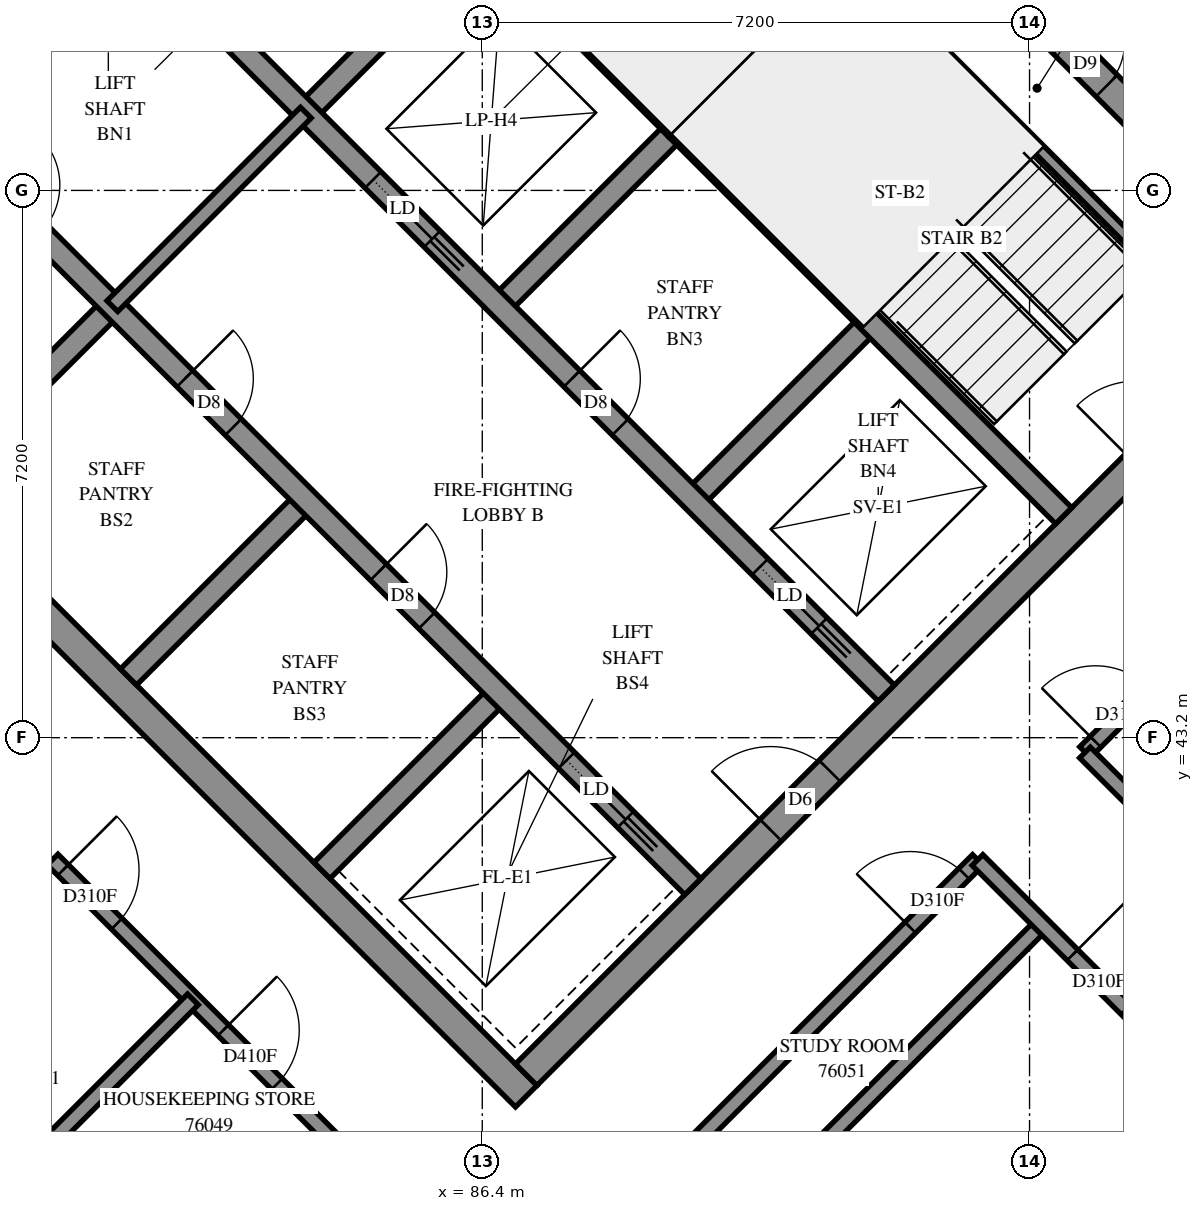
"""IFC4 building model, lengths in metres.
Left out: names, types, materials, properties, quantities, classifications, styles, units other than length and angle.
Written with IfcOpenShell. Run it as: python <this file> out.ifc"""

import sys

from ifc_helpers import new_model, si_unit, direction, frame, frame_2d, origin, place, context, subcontext, project, spatial, polyline, rectangle, outline, extrude, element, fill, save


model = new_model("IFC4")
c1 = context("Model", 3, precision=1e-05, world=origin(), true_north=direction((0.0, 1.0)))
c2 = subcontext(c1, "Body", "Model", "MODEL_VIEW")
j1 = project(units=[si_unit("LENGTHUNIT", "METRE"), si_unit("PLANEANGLEUNIT", "RADIAN")], contexts=[c1])
p1 = place(None, origin())
s1 = spatial("IfcSite", under=j1, at=p1, CompositionType="ELEMENT")
p2 = place(p1, origin())
s2 = spatial("IfcBuilding", under=s1, at=p2, CompositionType="ELEMENT")
p3 = place(p2, frame((0.0, 0.0, 277.8)))
s3 = spatial("IfcBuildingStorey", under=s2, at=p3, CompositionType="ELEMENT", Elevation=277.8)
p4 = place(p3, frame((76.23, 49.231, -0.3), z_axis=(0.0, 0.0, 1.0), x_axis=(0.7071034917, -0.7071100706, 0.0)))
e1 = element("IfcWall", 1, at=p4, inside=s3, PredefinedType="SHEAR", context=c2, shape_type="SweptSolid", body=[
    extrude(rectangle(XDim=15.2, YDim=0.4, at=frame_2d((7.6, 0.0))), origin(), (0.0, 0.0, 1.0), 2.7),
])
p5 = place(p3, frame((86.695, 59.696, -0.3), z_axis=(0.0, 0.0, 1.0), x_axis=(0.7071100706, -0.7071034917, 0.0)))
e2 = element("IfcWall", 2, at=p5, inside=s3, PredefinedType="SHEAR", context=c2, shape_type="SweptSolid", body=[
    extrude(rectangle(XDim=15.2, YDim=0.4, at=frame_2d((7.6, 0.0))), origin(), (0.0, 0.0, 1.0), 2.7),
])
p6 = place(p5, frame((10.4, 0.0, 0.3)))
e3 = element("IfcOpeningElement", 3, at=p6, cuts=e2, PredefinedType="OPENING", context=c2, shape_type="SweptSolid", body=[
    extrude(rectangle(XDim=0.8, YDim=2.1, at=frame_2d((0.4, 1.05))), frame((0.0, 0.21, 0.0), z_axis=(0.0, -1.0, 0.0), x_axis=(1.0, 0.0, 0.0)), (0.0, 0.0, 1.0), 0.42),
])
p7 = place(p3, frame((76.513, 49.231, -0.3), z_axis=(0.0, 0.0, 1.0), x_axis=(0.7071067812, 0.7071067812, 0.0)))
e4 = element("IfcWall", 4, at=p7, inside=s3, PredefinedType="SHEAR", context=c2, shape_type="SweptSolid", body=[
    extrude(rectangle(XDim=14.4, YDim=0.4, at=frame_2d((7.2, 0.0))), origin(), (0.0, 0.0, 1.0), 2.7),
])
p8 = place(p7, frame((4.55, 0.0, 0.3)))
e5 = element("IfcOpeningElement", 5, at=p8, cuts=e4, PredefinedType="OPENING", context=c2, shape_type="SweptSolid", body=[
    extrude(rectangle(XDim=1.1, YDim=2.1, at=frame_2d((0.55, 1.05))), frame((0.0, 0.21, 0.0), z_axis=(0.0, -1.0, 0.0), x_axis=(1.0, 0.0, 0.0)), (0.0, 0.0, 1.0), 0.42),
])
p9 = place(p7, frame((11.35, 0.0, 0.3)))
e6 = element("IfcOpeningElement", 6, at=p9, cuts=e4, PredefinedType="OPENING", context=c2, shape_type="SweptSolid", body=[
    extrude(rectangle(XDim=1.1, YDim=2.1, at=frame_2d((0.55, 1.05))), frame((0.0, 0.21, 0.0), z_axis=(0.0, -1.0, 0.0), x_axis=(1.0, 0.0, 0.0)), (0.0, 0.0, 1.0), 0.42),
])
p10 = place(p3, frame((86.978, 38.766, -0.3), z_axis=(0.0, 0.0, 1.0), x_axis=(0.7071067812, 0.7071067812, 0.0)))
e7 = element("IfcWall", 7, at=p10, inside=s3, PredefinedType="SHEAR", context=c2, shape_type="SweptSolid", body=[
    extrude(rectangle(XDim=14.4, YDim=0.4, at=frame_2d((7.2, 0.0))), origin(), (0.0, 0.0, 1.0), 2.7),
])
p11 = place(p10, frame((4.55, 0.0, 0.3)))
e8 = element("IfcOpeningElement", 8, at=p11, cuts=e7, PredefinedType="OPENING", context=c2, shape_type="SweptSolid", body=[
    extrude(rectangle(XDim=1.1, YDim=2.1, at=frame_2d((0.55, 1.05))), frame((0.0, 0.21, 0.0), z_axis=(0.0, -1.0, 0.0), x_axis=(1.0, 0.0, 0.0)), (0.0, 0.0, 1.0), 0.42),
])
p12 = place(p10, frame((11.35, 0.0, 0.3)))
e9 = element("IfcOpeningElement", 9, at=p12, cuts=e7, PredefinedType="OPENING", context=c2, shape_type="SweptSolid", body=[
    extrude(rectangle(XDim=1.1, YDim=2.1, at=frame_2d((0.55, 1.05))), frame((0.0, 0.21, 0.0), z_axis=(0.0, -1.0, 0.0), x_axis=(1.0, 0.0, 0.0)), (0.0, 0.0, 1.0), 0.42),
])
for number, where, z_axis, x_axis in (
    (10, (79.2, 46.544, 0.0), (0.0, 0.0, 1.0), (0.707, 0.707, 0.0)),
    (11, (84.079, 51.423, 0.0), (0.0, 0.0, 1.0), (0.707, 0.707, 0.0)),
):
    element("IfcWall", number, at=place(p3, frame(where, z_axis=z_axis, x_axis=x_axis)), inside=s3, PredefinedType="SOLIDWALL", context=c2, shape_type="SweptSolid", body=[
        extrude(rectangle(XDim=3.3, YDim=0.3, at=frame_2d((1.65, 0.0))), origin(), (0.0, 0.0, 1.0), 3.1),
    ])
p13 = place(p3, frame((81.746, 43.999, 0.0), z_axis=(0.0, 0.0, 1.0), x_axis=(0.7071067812, 0.7071067812, 0.0)))
e12 = element("IfcWall", 12, at=p13, inside=s3, PredefinedType="SOLIDWALL", context=c2, shape_type="SweptSolid", body=[
    extrude(rectangle(XDim=3.3, YDim=0.3, at=frame_2d((1.65, 0.0))), origin(), (0.0, 0.0, 1.0), 3.1),
])
p14 = place(p3, frame((86.625, 48.878, 0.0), z_axis=(0.0, 0.0, 1.0), x_axis=(0.7071067812, 0.7071067812, 0.0)))
e13 = element("IfcWall", 13, at=p14, inside=s3, PredefinedType="SOLIDWALL", context=c2, shape_type="SweptSolid", body=[
    extrude(rectangle(XDim=3.3, YDim=0.3, at=frame_2d((1.65, 0.0))), origin(), (0.0, 0.0, 1.0), 3.1),
])
p15 = place(p3, frame((84.291, 41.453, 0.0), z_axis=(0.0, 0.0, 1.0), x_axis=(0.7071067812, 0.7071067812, 0.0)))
e14 = element("IfcWall", 14, at=p15, inside=s3, PredefinedType="SOLIDWALL", context=c2, shape_type="SweptSolid", body=[
    extrude(rectangle(XDim=3.3, YDim=0.3, at=frame_2d((1.65, 0.0))), origin(), (0.0, 0.0, 1.0), 3.1),
])
p16 = place(p3, frame((89.17, 46.332, 0.0), z_axis=(0.0, 0.0, 1.0), x_axis=(0.7071067812, 0.7071067812, 0.0)))
e15 = element("IfcWall", 15, at=p16, inside=s3, PredefinedType="SOLIDWALL", context=c2, shape_type="SweptSolid", body=[
    extrude(rectangle(XDim=3.3, YDim=0.3, at=frame_2d((1.65, 0.0))), origin(), (0.0, 0.0, 1.0), 3.1),
])
p17 = place(p3, frame((78.988, 51.423, 0.0), z_axis=(0.0, 0.0, 1.0), x_axis=(0.7071067812, -0.7071067812, 0.0)))
e16 = element("IfcWall", 16, at=p17, inside=s3, PredefinedType="SOLIDWALL", context=c2, shape_type="SweptSolid", body=[
    extrude(rectangle(XDim=14.4, YDim=0.3, at=frame_2d((7.2, 0.0))), origin(), (0.0, 0.0, 1.0), 3.1),
])
p18 = place(p17, frame((1.35, 0.0, 0.0)))
e17 = element("IfcOpeningElement", 17, at=p18, cuts=e16, PredefinedType="OPENING", context=c2, shape_type="SweptSolid", body=[
    extrude(rectangle(XDim=0.9, YDim=2.1, at=frame_2d((0.45, 1.05))), frame((0.0, 0.16, 0.0), z_axis=(0.0, -1.0, 0.0), x_axis=(1.0, 0.0, 0.0)), (0.0, 0.0, 1.0), 0.32),
])
p19 = place(p17, frame((4.95, 0.0, 0.0)))
e18 = element("IfcOpeningElement", 18, at=p19, cuts=e16, PredefinedType="OPENING", context=c2, shape_type="SweptSolid", body=[
    extrude(rectangle(XDim=0.9, YDim=2.1, at=frame_2d((0.45, 1.05))), frame((0.0, 0.16, 0.0), z_axis=(0.0, -1.0, 0.0), x_axis=(1.0, 0.0, 0.0)), (0.0, 0.0, 1.0), 0.32),
])
p20 = place(p17, frame((8.55, 0.0, 0.0)))
e19 = element("IfcOpeningElement", 19, at=p20, cuts=e16, PredefinedType="OPENING", context=c2, shape_type="SweptSolid", body=[
    extrude(rectangle(XDim=0.9, YDim=2.1, at=frame_2d((0.45, 1.05))), frame((0.0, 0.16, 0.0), z_axis=(0.0, -1.0, 0.0), x_axis=(1.0, 0.0, 0.0)), (0.0, 0.0, 1.0), 0.32),
])
p21 = place(p17, frame((12.05, 0.0, 0.0)))
e20 = element("IfcOpeningElement", 20, at=p21, cuts=e16, PredefinedType="OPENING", context=c2, shape_type="SweptSolid", body=[
    extrude(rectangle(XDim=1.1, YDim=2.1, at=frame_2d((0.55, 1.05))), frame((0.0, 0.16, 0.0), z_axis=(0.0, -1.0, 0.0), x_axis=(1.0, 0.0, 0.0)), (0.0, 0.0, 1.0), 0.32),
])
p22 = place(p3, frame((81.534, 53.969, 0.0), z_axis=(0.0, 0.0, 1.0), x_axis=(0.707103309, -0.7071102534, 0.0)))
e21 = element("IfcWall", 21, at=p22, inside=s3, PredefinedType="SOLIDWALL", context=c2, shape_type="SweptSolid", body=[
    extrude(rectangle(XDim=14.4, YDim=0.3, at=frame_2d((7.2, 0.0))), origin(), (0.0, 0.0, 1.0), 3.1),
])
p23 = place(p22, frame((8.55, 0.0, 0.0)))
e22 = element("IfcOpeningElement", 22, at=p23, cuts=e21, PredefinedType="OPENING", context=c2, shape_type="SweptSolid", body=[
    extrude(rectangle(XDim=0.9, YDim=2.1, at=frame_2d((0.45, 1.05))), frame((0.0, 0.16, 0.0), z_axis=(0.0, -1.0, 0.0), x_axis=(1.0, 0.0, 0.0)), (0.0, 0.0, 1.0), 0.32),
])
p24 = place(p22, frame((1.25, 0.0, 0.0)))
e23 = element("IfcOpeningElement", 23, at=p24, cuts=e21, PredefinedType="OPENING", context=c2, shape_type="SweptSolid", body=[
    extrude(rectangle(XDim=1.1, YDim=2.1, at=frame_2d((0.55, 1.05))), frame((0.0, 0.16, 0.0), z_axis=(0.0, -1.0, 0.0), x_axis=(1.0, 0.0, 0.0)), (0.0, 0.0, 1.0), 0.32),
])
p25 = place(p22, frame((4.85, 0.0, 0.0)))
e24 = element("IfcOpeningElement", 24, at=p25, cuts=e21, PredefinedType="OPENING", context=c2, shape_type="SweptSolid", body=[
    extrude(rectangle(XDim=1.1, YDim=2.1, at=frame_2d((0.55, 1.05))), frame((0.0, 0.16, 0.0), z_axis=(0.0, -1.0, 0.0), x_axis=(1.0, 0.0, 0.0)), (0.0, 0.0, 1.0), 0.32),
])
p26 = place(p22, frame((12.05, 0.0, 0.0)))
e25 = element("IfcOpeningElement", 25, at=p26, cuts=e21, PredefinedType="OPENING", context=c2, shape_type="SweptSolid", body=[
    extrude(rectangle(XDim=1.1, YDim=2.1, at=frame_2d((0.55, 1.05))), frame((0.0, 0.16, 0.0), z_axis=(0.0, -1.0, 0.0), x_axis=(1.0, 0.0, 0.0)), (0.0, 0.0, 1.0), 0.32),
])
for number, where, z_axis, x_axis in (
    (26, (83.867, 56.302, 0.0), (0.0, 0.0, 1.0), (0.707, -0.707, 0.0)),
    (27, (88.958, 51.211, 0.0), (0.0, 0.0, 1.0), (0.707, -0.707, 0.0)),
):
    element("IfcWall", number, at=place(p3, frame(where, z_axis=z_axis, x_axis=x_axis)), inside=s3, PredefinedType="SOLIDWALL", context=c2, shape_type="SweptSolid", body=[
        extrude(rectangle(XDim=7.2, YDim=0.3, at=frame_2d((3.6, 0.0))), origin(), (0.0, 0.0, 1.0), 3.1),
    ])
p27 = place(p3, frame((88.958, 51.211, 0.0), z_axis=(0.0, 0.0, 1.0), x_axis=(0.7071067812, 0.7071067812, 0.0)))
e28 = element("IfcWall", 28, at=p27, inside=s3, PredefinedType="SOLIDWALL", context=c2, shape_type="SweptSolid", body=[
    extrude(rectangle(XDim=4.2, YDim=0.3, at=frame_2d((2.1, 0.0))), origin(), (0.0, 0.0, 1.0), 3.1),
])
p28 = place(p3, frame((82.405, 35.985, 0.0), z_axis=(0.0, 0.0, 1.0), x_axis=(-0.7071067812, 0.7071067812, 0.0)))
e29 = element("IfcWall", 29, at=p28, inside=s3, PredefinedType="PARAPET", context=c2, shape_type="SweptSolid", body=[
    extrude(outline(polyline([(0.0, -0.1), (4.874, -0.1), (4.874, 0.1), (0.0, 0.1), (0.0, -0.1)])), origin(), (0.0, 0.0, 1.0), 0.25),
])
p29 = place(p3, frame((91.313, 53.354, 0.0), z_axis=(0.0, 0.0, 1.0), x_axis=(0.7071067812, -0.7071067812, 0.0)))
e30 = element("IfcWall", 30, at=p29, inside=s3, PredefinedType="PARTITIONING", context=c2, shape_type="SweptSolid", body=[
    extrude(rectangle(XDim=5.65, YDim=0.15, at=frame_2d((2.825, 0.0))), origin(), (0.0, 0.0, 1.0), 3.1),
])
p30 = place(p3, frame((81.534, 48.878, 0.0), z_axis=(0.0, 0.0, 1.0), x_axis=(0.707092892, 0.7071206701, 0.0)))
e31 = element("IfcWall", 31, at=p30, inside=s3, PredefinedType="PARTITIONING", context=c2, shape_type="SweptSolid", body=[
    extrude(rectangle(XDim=3.6, YDim=0.2, at=frame_2d((1.8, 0.0))), origin(), (0.0, 0.0, 1.0), 3.1),
])
p31 = place(p3, frame((86.306, 33.287, 0.0), z_axis=(0.0, 0.0, 1.0), x_axis=(0.7071020418, 0.7071115206, 0.0)))
e32 = element("IfcWall", 32, at=p31, inside=s3, PredefinedType="PARTITIONING", context=c2, shape_type="SweptSolid", body=[
    extrude(rectangle(XDim=10.55, YDim=0.2, at=frame_2d((5.275, 0.0))), origin(), (0.0, 0.0, 1.0), 3.1),
])
p32 = place(p3, frame((80.747, 41.597, 0.0), z_axis=(0.0, 0.0, 1.0), x_axis=(0.7071067812, -0.7071067812, 0.0)))
e33 = element("IfcWall", 33, at=p32, inside=s3, PredefinedType="PARTITIONING", context=c2, shape_type="SweptSolid", body=[
    extrude(rectangle(XDim=8.607, YDim=0.2, at=frame_2d((4.303, 0.0))), origin(), (0.0, 0.0, 1.0), 3.1),
])
p33 = place(p32, frame((0.195, 0.0, 0.0)))
e34 = element("IfcOpeningElement", 34, at=p33, cuts=e33, PredefinedType="OPENING", context=c2, shape_type="SweptSolid", body=[
    extrude(rectangle(XDim=1.0, YDim=2.1, at=frame_2d((0.5, 1.05))), frame((0.0, 0.11, 0.0), z_axis=(0.0, -1.0, 0.0), x_axis=(1.0, 0.0, 0.0)), (0.0, 0.0, 1.0), 0.22),
])
p34 = place(p32, frame((3.175, 0.0, 0.0)))
e35 = element("IfcOpeningElement", 35, at=p34, cuts=e33, PredefinedType="OPENING", context=c2, shape_type="SweptSolid", body=[
    extrude(rectangle(XDim=1.0, YDim=2.1, at=frame_2d((0.5, 1.05))), frame((0.0, 0.11, 0.0), z_axis=(0.0, -1.0, 0.0), x_axis=(1.0, 0.0, 0.0)), (0.0, 0.0, 1.0), 0.22),
])
p35 = place(p3, frame((94.331, 43.009, 0.0), z_axis=(0.0, 0.0, 1.0), x_axis=(0.7071067812, 0.7071067812, 0.0)))
e36 = element("IfcWall", 36, at=p35, inside=s3, PredefinedType="PARTITIONING", context=c2, shape_type="SweptSolid", body=[
    extrude(rectangle(XDim=8.601, YDim=0.2, at=frame_2d((4.301, 0.0))), origin(), (0.0, 0.0, 1.0), 3.1),
])
p36 = place(p35, frame((0.194, 0.0, 0.0)))
e37 = element("IfcOpeningElement", 37, at=p36, cuts=e36, PredefinedType="OPENING", context=c2, shape_type="SweptSolid", body=[
    extrude(rectangle(XDim=1.0, YDim=2.1, at=frame_2d((0.5, 1.05))), frame((0.0, 0.11, 0.0), z_axis=(0.0, -1.0, 0.0), x_axis=(1.0, 0.0, 0.0)), (0.0, 0.0, 1.0), 0.22),
])
p37 = place(p3, frame((86.839, 35.511, 0.0), z_axis=(0.0, 0.0, 1.0), x_axis=(0.707223053, 0.7069904903, 0.0)))
e38 = element("IfcWall", 38, at=p37, inside=s3, PredefinedType="PARTITIONING", context=c2, shape_type="SweptSolid", body=[
    extrude(rectangle(XDim=8.6, YDim=0.2, at=frame_2d((4.3, 0.0))), origin(), (0.0, 0.0, 1.0), 3.1),
])
p38 = place(p37, frame((7.343, 0.0, 0.0)))
e39 = element("IfcOpeningElement", 39, at=p38, cuts=e38, PredefinedType="OPENING", context=c2, shape_type="SweptSolid", body=[
    extrude(rectangle(XDim=1.0, YDim=2.1, at=frame_2d((0.5, 1.05))), frame((0.0, 0.11, 0.0), z_axis=(0.0, -1.0, 0.0), x_axis=(1.0, 0.0, 0.0)), (0.0, 0.0, 1.0), 0.22),
])
p39 = place(p3, frame((94.617, 54.879, 0.0), z_axis=(0.0, 0.0, 1.0), x_axis=(0.7071067812, -0.7071067812, 0.0)))
e40 = element("IfcWall", 40, at=p39, inside=s3, PredefinedType="PARTITIONING", context=c2, shape_type="SweptSolid", body=[
    extrude(rectangle(XDim=6.191, YDim=0.2, at=frame_2d((3.096, 0.0))), origin(), (0.0, 0.0, 1.0), 3.1),
])
p40 = place(p39, frame((4.346, 0.0, 0.0)))
e41 = element("IfcOpeningElement", 41, at=p40, cuts=e40, PredefinedType="OPENING", context=c2, shape_type="SweptSolid", body=[
    extrude(rectangle(XDim=0.9, YDim=2.1, at=frame_2d((0.45, 1.05))), frame((0.0, 0.11, 0.0), z_axis=(0.0, -1.0, 0.0), x_axis=(1.0, 0.0, 0.0)), (0.0, 0.0, 1.0), 0.22),
])
p41 = place(p3, frame((92.915, 41.591, 0.0), z_axis=(0.0, 0.0, 1.0), x_axis=(0.7071067812, -0.7071067812, 0.0)))
e42 = element("IfcWall", 42, at=p41, inside=s3, PredefinedType="PARTITIONING", context=c2, shape_type="SweptSolid", body=[
    extrude(rectangle(XDim=4.8, YDim=0.2, at=frame_2d((2.4, 0.0))), origin(), (0.0, 0.0, 1.0), 3.1),
])
p42 = place(p41, frame((1.767, 0.0, 0.0)))
e43 = element("IfcOpeningElement", 43, at=p42, cuts=e42, PredefinedType="OPENING", context=c2, shape_type="SweptSolid", body=[
    extrude(rectangle(XDim=1.0, YDim=2.1, at=frame_2d((0.5, 1.05))), frame((0.0, 0.11, 0.0), z_axis=(0.0, -1.0, 0.0), x_axis=(1.0, 0.0, 0.0)), (0.0, 0.0, 1.0), 0.22),
])
p43 = place(p3, frame((94.329, 43.005, 0.0), z_axis=(0.0, 0.0, 1.0), x_axis=(0.7071067812, -0.7071067812, 0.0)))
e44 = element("IfcWall", 44, at=p43, inside=s3, PredefinedType="PARTITIONING", context=c2, shape_type="SweptSolid", body=[
    extrude(rectangle(XDim=4.8, YDim=0.2, at=frame_2d((2.4, 0.0))), origin(), (0.0, 0.0, 1.0), 3.1),
])
p44 = place(p43, frame((1.725, 0.0, 0.0)))
e45 = element("IfcOpeningElement", 45, at=p44, cuts=e44, PredefinedType="OPENING", context=c2, shape_type="SweptSolid", body=[
    extrude(rectangle(XDim=1.0, YDim=2.1, at=frame_2d((0.5, 1.05))), frame((0.0, 0.11, 0.0), z_axis=(0.0, -1.0, 0.0), x_axis=(1.0, 0.0, 0.0)), (0.0, 0.0, 1.0), 0.22),
])
p45 = place(p3, frame((79.612, 36.776, 0.0), z_axis=(0.0, 0.0, 1.0), x_axis=(0.7071186423, 0.7070949199, 0.0)))
e46 = element("IfcWall", 46, at=p45, inside=s3, PredefinedType="PARTITIONING", context=c2, shape_type="SweptSolid", body=[
    extrude(rectangle(XDim=4.215, YDim=0.2, at=frame_2d((2.108, 0.0))), origin(), (0.0, 0.0, 1.0), 3.1),
])
p46 = place(p3, frame((94.823, 36.713, 0.0), z_axis=(0.0, 0.0, 1.0), x_axis=(0.7071067812, 0.7071067812, 0.0)))
e47 = element("IfcWall", 47, at=p46, inside=s3, PredefinedType="PARTITIONING", context=c2, shape_type="SweptSolid", body=[
    extrude(rectangle(XDim=2.104, YDim=0.2, at=frame_2d((1.052, 0.0))), origin(), (0.0, 0.0, 1.0), 2.6),
])
p47 = place(p6, origin())
e48 = element("IfcDoor", 48, at=p47, inside=s3, OperationType="SINGLE_SWING_RIGHT", PredefinedType="DOOR", context=c2, shape_type="SweptSolid", body=[
    extrude(rectangle(XDim=0.8, YDim=2.1, at=frame_2d((0.4, 1.05))), frame((0.0, 0.025, 0.0), z_axis=(0.0, -1.0, 0.0), x_axis=(1.0, 0.0, 0.0)), (0.0, 0.0, 1.0), 0.05),
])
fill(e3, e48)
p48 = place(p11, origin())
e49 = element("IfcDoor", 49, at=p48, inside=s3, OperationType="DOUBLE_DOOR_SINGLE_SWING", PredefinedType="DOOR", context=c2, shape_type="SweptSolid", body=[
    extrude(rectangle(XDim=1.1, YDim=2.1, at=frame_2d((0.55, 1.05))), frame((0.0, 0.025, 0.0), z_axis=(0.0, -1.0, 0.0), x_axis=(1.0, 0.0, 0.0)), (0.0, 0.0, 1.0), 0.05),
])
fill(e8, e49)
p49 = place(p19, origin())
e50 = element("IfcDoor", 50, at=p49, inside=s3, OperationType="SINGLE_SWING_LEFT", PredefinedType="DOOR", context=c2, shape_type="SweptSolid", body=[
    extrude(rectangle(XDim=0.9, YDim=2.1, at=frame_2d((0.45, 1.05))), frame((0.0, 0.025, 0.0), z_axis=(0.0, -1.0, 0.0), x_axis=(1.0, 0.0, 0.0)), (0.0, 0.0, 1.0), 0.05),
])
fill(e18, e50)
p50 = place(p20, origin())
e51 = element("IfcDoor", 51, at=p50, inside=s3, OperationType="SINGLE_SWING_LEFT", PredefinedType="DOOR", context=c2, shape_type="SweptSolid", body=[
    extrude(rectangle(XDim=0.9, YDim=2.1, at=frame_2d((0.45, 1.05))), frame((0.0, 0.025, 0.0), z_axis=(0.0, -1.0, 0.0), x_axis=(1.0, 0.0, 0.0)), (0.0, 0.0, 1.0), 0.05),
])
fill(e19, e51)
p51 = place(p23, origin())
e52 = element("IfcDoor", 52, at=p51, inside=s3, OperationType="SINGLE_SWING_LEFT", PredefinedType="DOOR", context=c2, shape_type="SweptSolid", body=[
    extrude(rectangle(XDim=0.9, YDim=2.1, at=frame_2d((0.45, 1.05))), frame((0.0, 0.025, 0.0), z_axis=(0.0, -1.0, 0.0), x_axis=(1.0, 0.0, 0.0)), (0.0, 0.0, 1.0), 0.05),
])
fill(e22, e52)
p52 = place(p21, origin())
e53 = element("IfcDoor", 53, at=p52, inside=s3, OperationType="SLIDING_TO_RIGHT", PredefinedType="DOOR", context=c2, shape_type="SweptSolid", body=[
    extrude(rectangle(XDim=1.1, YDim=2.1, at=frame_2d((0.55, 1.05))), frame((0.0, 0.025, 0.0), z_axis=(0.0, -1.0, 0.0), x_axis=(1.0, 0.0, 0.0)), (0.0, 0.0, 1.0), 0.05),
])
fill(e20, e53)
p53 = place(p25, origin())
e54 = element("IfcDoor", 54, at=p53, inside=s3, OperationType="SLIDING_TO_RIGHT", PredefinedType="DOOR", context=c2, shape_type="SweptSolid", body=[
    extrude(rectangle(XDim=1.1, YDim=2.1, at=frame_2d((0.55, 1.05))), frame((0.0, 0.025, 0.0), z_axis=(0.0, -1.0, 0.0), x_axis=(1.0, 0.0, 0.0)), (0.0, 0.0, 1.0), 0.05),
])
fill(e24, e54)
p54 = place(p26, origin())
e55 = element("IfcDoor", 55, at=p54, inside=s3, OperationType="SLIDING_TO_RIGHT", PredefinedType="DOOR", context=c2, shape_type="SweptSolid", body=[
    extrude(rectangle(XDim=1.1, YDim=2.1, at=frame_2d((0.55, 1.05))), frame((0.0, 0.025, 0.0), z_axis=(0.0, -1.0, 0.0), x_axis=(1.0, 0.0, 0.0)), (0.0, 0.0, 1.0), 0.05),
])
fill(e25, e55)
p55 = place(p33, origin())
e56 = element("IfcDoor", 56, at=p55, inside=s3, OperationType="SINGLE_SWING_LEFT", PredefinedType="DOOR", context=c2, shape_type="SweptSolid", body=[
    extrude(rectangle(XDim=1.0, YDim=2.1, at=frame_2d((0.5, 1.05))), frame((0.0, 0.025, 0.0), z_axis=(0.0, -1.0, 0.0), x_axis=(1.0, 0.0, 0.0)), (0.0, 0.0, 1.0), 0.05),
])
fill(e34, e56)
p56 = place(p34, origin())
e57 = element("IfcDoor", 57, at=p56, inside=s3, OperationType="SINGLE_SWING_LEFT", PredefinedType="DOOR", context=c2, shape_type="SweptSolid", body=[
    extrude(rectangle(XDim=1.0, YDim=2.1, at=frame_2d((0.5, 1.05))), frame((0.0, 0.025, 0.0), z_axis=(0.0, -1.0, 0.0), x_axis=(1.0, 0.0, 0.0)), (0.0, 0.0, 1.0), 0.05),
])
fill(e35, e57)
p57 = place(p36, origin())
e58 = element("IfcDoor", 58, at=p57, inside=s3, OperationType="SINGLE_SWING_LEFT", PredefinedType="DOOR", context=c2, shape_type="SweptSolid", body=[
    extrude(rectangle(XDim=1.0, YDim=2.1, at=frame_2d((0.5, 1.05))), frame((0.0, 0.025, 0.0), z_axis=(0.0, -1.0, 0.0), x_axis=(1.0, 0.0, 0.0)), (0.0, 0.0, 1.0), 0.05),
])
fill(e37, e58)
p58 = place(p38, origin())
e59 = element("IfcDoor", 59, at=p58, inside=s3, OperationType="SINGLE_SWING_RIGHT", PredefinedType="DOOR", context=c2, shape_type="SweptSolid", body=[
    extrude(rectangle(XDim=1.0, YDim=2.1, at=frame_2d((0.5, 1.05))), frame((0.0, 0.025, 0.0), z_axis=(0.0, -1.0, 0.0), x_axis=(1.0, 0.0, 0.0)), (0.0, 0.0, 1.0), 0.05),
])
fill(e39, e59)
p59 = place(p42, origin())
e60 = element("IfcDoor", 60, at=p59, inside=s3, OperationType="SINGLE_SWING_LEFT", PredefinedType="DOOR", context=c2, shape_type="SweptSolid", body=[
    extrude(rectangle(XDim=1.0, YDim=2.1, at=frame_2d((0.5, 1.05))), frame((0.0, 0.025, 0.0), z_axis=(0.0, -1.0, 0.0), x_axis=(1.0, 0.0, 0.0)), (0.0, 0.0, 1.0), 0.05),
])
fill(e43, e60)
save(model, sys.argv[1])
